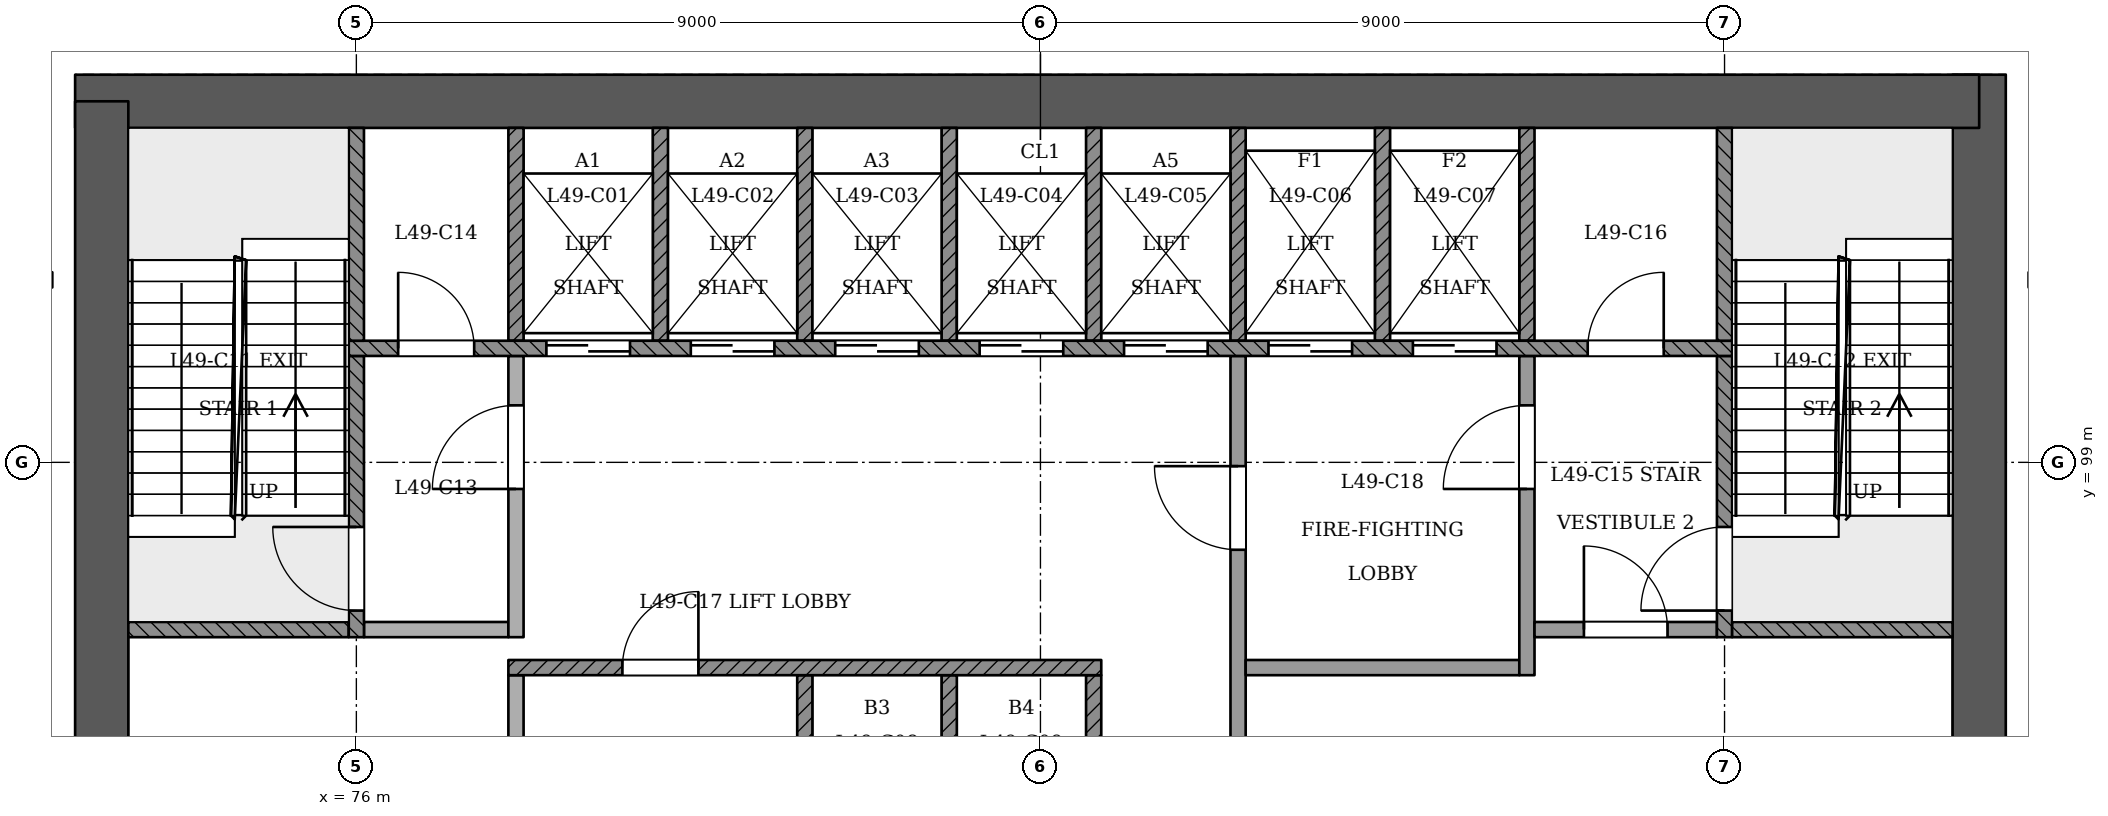
"""IFC4 building model, lengths in metres.
Left out: names, types, materials, properties, quantities, classifications, styles, units other than length and angle.
Written with IfcOpenShell. Run it as: python <this file> out.ifc"""

import sys

from ifc_helpers import new_model, si_unit, direction, frame, frame_2d, origin, place, context, subcontext, project, spatial, rectangle, extrude, element, fill, save


model = new_model("IFC4")
c1 = context("Model", 3, precision=1e-05, world=origin(), true_north=direction((0.0, 1.0)))
c2 = subcontext(c1, "Body", "Model", "MODEL_VIEW")
j1 = project(units=[si_unit("LENGTHUNIT", "METRE"), si_unit("PLANEANGLEUNIT", "RADIAN")], contexts=[c1])
p1 = place(None, origin())
s1 = spatial("IfcSite", under=j1, at=p1, CompositionType="ELEMENT")
p2 = place(p1, origin())
s2 = spatial("IfcBuilding", under=s1, at=p2, CompositionType="ELEMENT")
p3 = place(p2, frame((0.0, 0.0, 189.0)))
s3 = spatial("IfcBuildingStorey", under=s2, at=p3, CompositionType="ELEMENT", Elevation=189.0)
p4 = place(p3, frame((97.35, 93.05, 0.0), z_axis=(0.0, 0.0, 1.0), x_axis=(0.0, 1.0, 0.0)))
e1 = element("IfcWall", 1, at=p4, inside=s3, PredefinedType="SHEAR", context=c2, shape_type="SweptSolid", body=[
    extrude(rectangle(XDim=11.05, YDim=0.7, at=frame_2d((5.525, 0.0))), origin(), (0.0, 0.0, 1.0), 5.4),
])
p5 = place(p3, frame((97.35, 103.75, 0.0), z_axis=(0.0, 0.0, 1.0), x_axis=(-1.0, 0.0, 0.0)))
e2 = element("IfcWall", 2, at=p5, inside=s3, PredefinedType="SHEAR", context=c2, shape_type="SweptSolid", body=[
    extrude(rectangle(XDim=25.05, YDim=0.7, at=frame_2d((12.525, 0.0))), origin(), (0.0, 0.0, 1.0), 5.4),
])
p6 = place(p3, frame((72.65, 103.75, 0.0), z_axis=(0.0, 0.0, 1.0), x_axis=(0.0, -1.0, 0.0)))
e3 = element("IfcWall", 3, at=p6, inside=s3, PredefinedType="SHEAR", context=c2, shape_type="SweptSolid", body=[
    extrude(rectangle(XDim=11.05, YDim=0.7, at=frame_2d((5.525, 0.0))), origin(), (0.0, 0.0, 1.0), 5.4),
])
p7 = place(p3, frame((99.701, 101.4, 0.0), z_axis=(0.0, 0.0, 1.0), x_axis=(-0.999999958796, 0.000287067593, 0.0)))
e4 = element("IfcWall", 4, at=p7, inside=s3, PredefinedType="PARTITIONING", context=c2, shape_type="SweptSolid", body=[
    extrude(rectangle(XDim=1.701, YDim=0.2, at=frame_2d((0.851, 0.0))), origin(), (0.0, 0.0, 1.0), 4.95),
])
p8 = place(p3, frame((78.1, 93.4, 0.0), z_axis=(0.0, 0.0, 1.0), x_axis=(0.0, 1.0, 0.0)))
e5 = element("IfcWall", 5, at=p8, inside=s3, PredefinedType="PARTITIONING", context=c2, shape_type="SweptSolid", body=[
    extrude(rectangle(XDim=2.8, YDim=0.2, at=frame_2d((1.4, 0.0))), origin(), (0.0, 0.0, 1.0), 4.95),
])
for number, where, z_axis, x_axis in (
    (6, (81.9, 93.4, 0.0), (0.0, 0.0, 1.0), (0.0, 1.0, 0.0)),
    (7, (83.8, 93.4, 0.0), (0.0, 0.0, 1.0), (0.0, 1.0, 0.0)),
    (8, (85.7, 93.4, 0.0), (0.0, 0.0, 1.0), (0.0, 1.0, 0.0)),
):
    element("IfcWall", number, at=place(p3, frame(where, z_axis=z_axis, x_axis=x_axis)), inside=s3, PredefinedType="SOLIDWALL", context=c2, shape_type="SweptSolid", body=[
        extrude(rectangle(XDim=2.8, YDim=0.2, at=frame_2d((1.4, 0.0))), origin(), (0.0, 0.0, 1.0), 4.95),
    ])
p9 = place(p3, frame((87.6, 93.4, 0.0), z_axis=(0.0, 0.0, 1.0), x_axis=(0.0, 1.0, 0.0)))
e9 = element("IfcWall", 9, at=p9, inside=s3, PredefinedType="PARTITIONING", context=c2, shape_type="SweptSolid", body=[
    extrude(rectangle(XDim=7.0, YDim=0.2, at=frame_2d((3.5, 0.0))), origin(), (0.0, 0.0, 1.0), 4.95),
])
p10 = place(p9, frame((4.45, 0.0, 0.0)))
e10 = element("IfcOpeningElement", 10, at=p10, cuts=e9, PredefinedType="OPENING", context=c2, shape_type="SweptSolid", body=[
    extrude(rectangle(XDim=1.1, YDim=2.1, at=frame_2d((0.55, 1.05))), frame((0.0, 0.11, 0.0), z_axis=(0.0, -1.0, 0.0), x_axis=(1.0, 0.0, 0.0)), (0.0, 0.0, 1.0), 0.221),
])
p11 = place(p3, frame((78.0, 96.3, 0.0), z_axis=(0.0, 0.0, 1.0), x_axis=(1.0, 0.0, 0.0)))
e11 = element("IfcWall", 11, at=p11, inside=s3, PredefinedType="SOLIDWALL", context=c2, shape_type="SweptSolid", body=[
    extrude(rectangle(XDim=7.8, YDim=0.2, at=frame_2d((3.9, 0.0))), origin(), (0.0, 0.0, 1.0), 4.95),
])
p12 = place(p11, frame((1.5, 0.0, 0.0)))
e12 = element("IfcOpeningElement", 12, at=p12, cuts=e11, PredefinedType="OPENING", context=c2, shape_type="SweptSolid", body=[
    extrude(rectangle(XDim=1.0, YDim=2.1, at=frame_2d((0.5, 1.05))), frame((0.0, 0.11, 0.0), z_axis=(0.0, -1.0, 0.0), x_axis=(1.0, 0.0, 0.0)), (0.0, 0.0, 1.0), 0.221),
])
p13 = place(p3, frame((87.7, 96.3, 0.0), z_axis=(0.0, 0.0, 1.0), x_axis=(1.0, 0.0, 0.0)))
e13 = element("IfcWall", 13, at=p13, inside=s3, PredefinedType="PARTITIONING", context=c2, shape_type="SweptSolid", body=[
    extrude(rectangle(XDim=3.6, YDim=0.2, at=frame_2d((1.8, 0.0))), origin(), (0.0, 0.0, 1.0), 4.95),
])
p14 = place(p3, frame((91.4, 96.2, 0.0), z_axis=(0.0, 0.0, 1.0), x_axis=(0.0, 1.0, 0.0)))
e14 = element("IfcWall", 14, at=p14, inside=s3, PredefinedType="PARTITIONING", context=c2, shape_type="SweptSolid", body=[
    extrude(rectangle(XDim=4.2, YDim=0.2, at=frame_2d((2.1, 0.0))), origin(), (0.0, 0.0, 1.0), 4.95),
])
p15 = place(p14, frame((2.45, 0.0, 0.0)))
e15 = element("IfcOpeningElement", 15, at=p15, cuts=e14, PredefinedType="OPENING", context=c2, shape_type="SweptSolid", body=[
    extrude(rectangle(XDim=1.1, YDim=2.1, at=frame_2d((0.55, 1.05))), frame((0.0, 0.11, 0.0), z_axis=(0.0, -1.0, 0.0), x_axis=(1.0, 0.0, 0.0)), (0.0, 0.0, 1.0), 0.221),
])
p16 = place(p3, frame((73.0, 96.8, 0.0), z_axis=(0.0, 0.0, 1.0), x_axis=(1.0, 0.0, 0.0)))
e16 = element("IfcWall", 16, at=p16, inside=s3, PredefinedType="SOLIDWALL", context=c2, shape_type="SweptSolid", body=[
    extrude(rectangle(XDim=2.9, YDim=0.2, at=frame_2d((1.45, 0.0))), origin(), (0.0, 0.0, 1.0), 4.95),
])
p17 = place(p3, frame((76.0, 96.7, 0.0), z_axis=(0.0, 0.0, 1.0), x_axis=(0.0, 1.0, 0.0)))
e17 = element("IfcWall", 17, at=p17, inside=s3, PredefinedType="SOLIDWALL", context=c2, shape_type="SweptSolid", body=[
    extrude(rectangle(XDim=3.7, YDim=0.2, at=frame_2d((1.85, 0.0))), origin(), (0.0, 0.0, 1.0), 4.95),
])
p18 = place(p17, frame((0.35, 0.0, 0.0)))
e18 = element("IfcOpeningElement", 18, at=p18, cuts=e17, PredefinedType="OPENING", context=c2, shape_type="SweptSolid", body=[
    extrude(rectangle(XDim=1.1, YDim=2.1, at=frame_2d((0.55, 1.05))), frame((0.0, 0.11, 0.0), z_axis=(0.0, -1.0, 0.0), x_axis=(1.0, 0.0, 0.0)), (0.0, 0.0, 1.0), 0.221),
])
p19 = place(p3, frame((76.1, 96.8, 0.0), z_axis=(0.0, 0.0, 1.0), x_axis=(1.0, 0.0, 0.0)))
e19 = element("IfcWall", 19, at=p19, inside=s3, PredefinedType="PARTITIONING", context=c2, shape_type="SweptSolid", body=[
    extrude(rectangle(XDim=1.9, YDim=0.2, at=frame_2d((0.95, 0.0))), origin(), (0.0, 0.0, 1.0), 4.95),
])
p20 = place(p3, frame((78.1, 96.7, 0.0), z_axis=(0.0, 0.0, 1.0), x_axis=(0.0, 1.0, 0.0)))
e20 = element("IfcWall", 20, at=p20, inside=s3, PredefinedType="PARTITIONING", context=c2, shape_type="SweptSolid", body=[
    extrude(rectangle(XDim=3.7, YDim=0.2, at=frame_2d((1.85, 0.0))), origin(), (0.0, 0.0, 1.0), 4.95),
])
p21 = place(p20, frame((1.95, 0.0, 0.0)))
e21 = element("IfcOpeningElement", 21, at=p21, cuts=e20, PredefinedType="OPENING", context=c2, shape_type="SweptSolid", body=[
    extrude(rectangle(XDim=1.1, YDim=2.1, at=frame_2d((0.55, 1.05))), frame((0.0, 0.11, 0.0), z_axis=(0.0, -1.0, 0.0), x_axis=(1.0, 0.0, 0.0)), (0.0, 0.0, 1.0), 0.221),
])
p22 = place(p3, frame((91.5, 96.8, 0.0), z_axis=(0.0, 0.0, 1.0), x_axis=(1.0, 0.0, 0.0)))
e22 = element("IfcWall", 22, at=p22, inside=s3, PredefinedType="PARTITIONING", context=c2, shape_type="SweptSolid", body=[
    extrude(rectangle(XDim=2.4, YDim=0.2, at=frame_2d((1.2, 0.0))), origin(), (0.0, 0.0, 1.0), 4.95),
])
p23 = place(p22, frame((0.65, 0.0, 0.0)))
e23 = element("IfcOpeningElement", 23, at=p23, cuts=e22, PredefinedType="OPENING", context=c2, shape_type="SweptSolid", body=[
    extrude(rectangle(XDim=1.1, YDim=2.1, at=frame_2d((0.55, 1.05))), frame((0.0, 0.11, 0.0), z_axis=(0.0, -1.0, 0.0), x_axis=(1.0, 0.0, 0.0)), (0.0, 0.0, 1.0), 0.221),
])
p24 = place(p3, frame((94.0, 96.7, 0.0), z_axis=(0.0, 0.0, 1.0), x_axis=(0.0, 1.0, 0.0)))
e24 = element("IfcWall", 24, at=p24, inside=s3, PredefinedType="SOLIDWALL", context=c2, shape_type="SweptSolid", body=[
    extrude(rectangle(XDim=3.7, YDim=0.2, at=frame_2d((1.85, 0.0))), origin(), (0.0, 0.0, 1.0), 4.95),
])
p25 = place(p24, frame((0.35, 0.0, 0.0)))
e25 = element("IfcOpeningElement", 25, at=p25, cuts=e24, PredefinedType="OPENING", context=c2, shape_type="SweptSolid", body=[
    extrude(rectangle(XDim=1.1, YDim=2.1, at=frame_2d((0.55, 1.05))), frame((0.0, 0.11, 0.0), z_axis=(0.0, -1.0, 0.0), x_axis=(1.0, 0.0, 0.0)), (0.0, 0.0, 1.0), 0.221),
])
p26 = place(p3, frame((94.1, 96.8, 0.0), z_axis=(0.0, 0.0, 1.0), x_axis=(1.0, 0.0, 0.0)))
e26 = element("IfcWall", 26, at=p26, inside=s3, PredefinedType="SOLIDWALL", context=c2, shape_type="SweptSolid", body=[
    extrude(rectangle(XDim=2.9, YDim=0.2, at=frame_2d((1.45, 0.0))), origin(), (0.0, 0.0, 1.0), 4.95),
])
p27 = place(p3, frame((75.9, 100.5, 0.0), z_axis=(0.0, 0.0, 1.0), x_axis=(1.0, 0.0, 0.0)))
e27 = element("IfcWall", 27, at=p27, inside=s3, PredefinedType="SOLIDWALL", context=c2, shape_type="SweptSolid", body=[
    extrude(rectangle(XDim=18.2, YDim=0.2, at=frame_2d((9.1, 0.0))), origin(), (0.0, 0.0, 1.0), 4.95),
])
p28 = place(p27, frame((2.6, 0.0, 0.0)))
e28 = element("IfcOpeningElement", 28, at=p28, cuts=e27, PredefinedType="OPENING", context=c2, shape_type="SweptSolid", body=[
    extrude(rectangle(XDim=1.1, YDim=2.1, at=frame_2d((0.55, 1.05))), frame((0.0, 0.11, 0.0), z_axis=(0.0, -1.0, 0.0), x_axis=(1.0, 0.0, 0.0)), (0.0, 0.0, 1.0), 0.221),
])
p29 = place(p27, frame((4.5, 0.0, 0.0)))
e29 = element("IfcOpeningElement", 29, at=p29, cuts=e27, PredefinedType="OPENING", context=c2, shape_type="SweptSolid", body=[
    extrude(rectangle(XDim=1.1, YDim=2.1, at=frame_2d((0.55, 1.05))), frame((0.0, 0.11, 0.0), z_axis=(0.0, -1.0, 0.0), x_axis=(1.0, 0.0, 0.0)), (0.0, 0.0, 1.0), 0.221),
])
p30 = place(p27, frame((6.4, 0.0, 0.0)))
e30 = element("IfcOpeningElement", 30, at=p30, cuts=e27, PredefinedType="OPENING", context=c2, shape_type="SweptSolid", body=[
    extrude(rectangle(XDim=1.1, YDim=2.1, at=frame_2d((0.55, 1.05))), frame((0.0, 0.11, 0.0), z_axis=(0.0, -1.0, 0.0), x_axis=(1.0, 0.0, 0.0)), (0.0, 0.0, 1.0), 0.221),
])
p31 = place(p27, frame((8.3, 0.0, 0.0)))
e31 = element("IfcOpeningElement", 31, at=p31, cuts=e27, PredefinedType="OPENING", context=c2, shape_type="SweptSolid", body=[
    extrude(rectangle(XDim=1.1, YDim=2.1, at=frame_2d((0.55, 1.05))), frame((0.0, 0.11, 0.0), z_axis=(0.0, -1.0, 0.0), x_axis=(1.0, 0.0, 0.0)), (0.0, 0.0, 1.0), 0.221),
])
p32 = place(p27, frame((10.2, 0.0, 0.0)))
e32 = element("IfcOpeningElement", 32, at=p32, cuts=e27, PredefinedType="OPENING", context=c2, shape_type="SweptSolid", body=[
    extrude(rectangle(XDim=1.1, YDim=2.1, at=frame_2d((0.55, 1.05))), frame((0.0, 0.11, 0.0), z_axis=(0.0, -1.0, 0.0), x_axis=(1.0, 0.0, 0.0)), (0.0, 0.0, 1.0), 0.221),
])
p33 = place(p27, frame((12.1, 0.0, 0.0)))
e33 = element("IfcOpeningElement", 33, at=p33, cuts=e27, PredefinedType="OPENING", context=c2, shape_type="SweptSolid", body=[
    extrude(rectangle(XDim=1.1, YDim=2.1, at=frame_2d((0.55, 1.05))), frame((0.0, 0.11, 0.0), z_axis=(0.0, -1.0, 0.0), x_axis=(1.0, 0.0, 0.0)), (0.0, 0.0, 1.0), 0.221),
])
p34 = place(p27, frame((14.0, 0.0, 0.0)))
e34 = element("IfcOpeningElement", 34, at=p34, cuts=e27, PredefinedType="OPENING", context=c2, shape_type="SweptSolid", body=[
    extrude(rectangle(XDim=1.1, YDim=2.1, at=frame_2d((0.55, 1.05))), frame((0.0, 0.11, 0.0), z_axis=(0.0, -1.0, 0.0), x_axis=(1.0, 0.0, 0.0)), (0.0, 0.0, 1.0), 0.221),
])
p35 = place(p27, frame((0.65, 0.0, 0.0)))
e35 = element("IfcOpeningElement", 35, at=p35, cuts=e27, PredefinedType="OPENING", context=c2, shape_type="SweptSolid", body=[
    extrude(rectangle(XDim=1.0, YDim=2.1, at=frame_2d((0.5, 1.05))), frame((0.0, 0.11, 0.0), z_axis=(0.0, -1.0, 0.0), x_axis=(1.0, 0.0, 0.0)), (0.0, 0.0, 1.0), 0.221),
])
p36 = place(p27, frame((16.3, 0.0, 0.0)))
e36 = element("IfcOpeningElement", 36, at=p36, cuts=e27, PredefinedType="OPENING", context=c2, shape_type="SweptSolid", body=[
    extrude(rectangle(XDim=1.0, YDim=2.1, at=frame_2d((0.5, 1.05))), frame((0.0, 0.11, 0.0), z_axis=(0.0, -1.0, 0.0), x_axis=(1.0, 0.0, 0.0)), (0.0, 0.0, 1.0), 0.221),
])
for number, where, z_axis, x_axis in (
    (37, (76.0, 100.6, 0.0), (0.0, 0.0, 1.0), (0.0, 1.0, 0.0)),
    (38, (78.1, 100.6, 0.0), (0.0, 0.0, 1.0), (0.0, 1.0, 0.0)),
    (39, (80.0, 100.6, 0.0), (0.0, 0.0, 1.0), (0.0, 1.0, 0.0)),
    (40, (81.9, 100.6, 0.0), (0.0, 0.0, 1.0), (0.0, 1.0, 0.0)),
    (41, (83.8, 100.6, 0.0), (0.0, 0.0, 1.0), (0.0, 1.0, 0.0)),
    (42, (85.7, 100.6, 0.0), (0.0, 0.0, 1.0), (0.0, 1.0, 0.0)),
    (43, (87.6, 100.6, 0.0), (0.0, 0.0, 1.0), (0.0, 1.0, 0.0)),
    (44, (89.5, 100.6, 0.0), (0.0, 0.0, 1.0), (0.0, 1.0, 0.0)),
    (45, (91.4, 100.6, 0.0), (0.0, 0.0, 1.0), (0.0, 1.0, 0.0)),
    (46, (94.0, 100.6, 0.0), (0.0, 0.0, 1.0), (0.0, 1.0, 0.0)),
):
    element("IfcWall", number, at=place(p3, frame(where, z_axis=z_axis, x_axis=x_axis)), inside=s3, PredefinedType="SOLIDWALL", context=c2, shape_type="SweptSolid", body=[
        extrude(rectangle(XDim=2.8, YDim=0.2, at=frame_2d((1.4, 0.0))), origin(), (0.0, 0.0, 1.0), 4.95),
    ])
p37 = place(p28, origin())
e47 = element("IfcDoor", 47, at=p37, inside=s3, OperationType="SLIDING_TO_RIGHT", PredefinedType="NOTDEFINED", context=c2, shape_type="SweptSolid", body=[
    extrude(rectangle(XDim=1.1, YDim=2.1, at=frame_2d((0.55, 1.05))), frame((0.0, 0.025, 0.0), z_axis=(0.0, -1.0, 0.0), x_axis=(1.0, 0.0, 0.0)), (0.0, 0.0, 1.0), 0.05),
])
fill(e28, e47)
p38 = place(p29, origin())
e48 = element("IfcDoor", 48, at=p38, inside=s3, OperationType="SLIDING_TO_LEFT", PredefinedType="NOTDEFINED", context=c2, shape_type="SweptSolid", body=[
    extrude(rectangle(XDim=1.1, YDim=2.1, at=frame_2d((0.55, 1.05))), frame((0.0, 0.025, 0.0), z_axis=(0.0, -1.0, 0.0), x_axis=(1.0, 0.0, 0.0)), (0.0, 0.0, 1.0), 0.05),
])
fill(e29, e48)
p39 = place(p30, origin())
e49 = element("IfcDoor", 49, at=p39, inside=s3, OperationType="SLIDING_TO_RIGHT", PredefinedType="NOTDEFINED", context=c2, shape_type="SweptSolid", body=[
    extrude(rectangle(XDim=1.1, YDim=2.1, at=frame_2d((0.55, 1.05))), frame((0.0, 0.025, 0.0), z_axis=(0.0, -1.0, 0.0), x_axis=(1.0, 0.0, 0.0)), (0.0, 0.0, 1.0), 0.05),
])
fill(e30, e49)
p40 = place(p31, origin())
e50 = element("IfcDoor", 50, at=p40, inside=s3, OperationType="SLIDING_TO_LEFT", PredefinedType="NOTDEFINED", context=c2, shape_type="SweptSolid", body=[
    extrude(rectangle(XDim=1.1, YDim=2.1, at=frame_2d((0.55, 1.05))), frame((0.0, 0.025, 0.0), z_axis=(0.0, -1.0, 0.0), x_axis=(1.0, 0.0, 0.0)), (0.0, 0.0, 1.0), 0.05),
])
fill(e31, e50)
p41 = place(p32, origin())
e51 = element("IfcDoor", 51, at=p41, inside=s3, OperationType="SLIDING_TO_RIGHT", PredefinedType="NOTDEFINED", context=c2, shape_type="SweptSolid", body=[
    extrude(rectangle(XDim=1.1, YDim=2.1, at=frame_2d((0.55, 1.05))), frame((0.0, 0.025, 0.0), z_axis=(0.0, -1.0, 0.0), x_axis=(1.0, 0.0, 0.0)), (0.0, 0.0, 1.0), 0.05),
])
fill(e32, e51)
p42 = place(p33, origin())
e52 = element("IfcDoor", 52, at=p42, inside=s3, OperationType="SLIDING_TO_RIGHT", PredefinedType="NOTDEFINED", context=c2, shape_type="SweptSolid", body=[
    extrude(rectangle(XDim=1.1, YDim=2.1, at=frame_2d((0.55, 1.05))), frame((0.0, 0.025, 0.0), z_axis=(0.0, -1.0, 0.0), x_axis=(1.0, 0.0, 0.0)), (0.0, 0.0, 1.0), 0.05),
])
fill(e33, e52)
p43 = place(p34, origin())
e53 = element("IfcDoor", 53, at=p43, inside=s3, OperationType="SLIDING_TO_LEFT", PredefinedType="NOTDEFINED", context=c2, shape_type="SweptSolid", body=[
    extrude(rectangle(XDim=1.1, YDim=2.1, at=frame_2d((0.55, 1.05))), frame((0.0, 0.025, 0.0), z_axis=(0.0, -1.0, 0.0), x_axis=(1.0, 0.0, 0.0)), (0.0, 0.0, 1.0), 0.05),
])
fill(e34, e53)
p44 = place(p18, origin())
e54 = element("IfcDoor", 54, at=p44, inside=s3, OperationType="SINGLE_SWING_RIGHT", PredefinedType="NOTDEFINED", context=c2, shape_type="SweptSolid", body=[
    extrude(rectangle(XDim=1.1, YDim=2.1, at=frame_2d((0.55, 1.05))), frame((0.0, 0.025, 0.0), z_axis=(0.0, -1.0, 0.0), x_axis=(1.0, 0.0, 0.0)), (0.0, 0.0, 1.0), 0.05),
])
fill(e18, e54)
p45 = place(p25, origin())
e55 = element("IfcDoor", 55, at=p45, inside=s3, OperationType="SINGLE_SWING_LEFT", PredefinedType="NOTDEFINED", context=c2, shape_type="SweptSolid", body=[
    extrude(rectangle(XDim=1.1, YDim=2.1, at=frame_2d((0.55, 1.05))), frame((0.0, 0.025, 0.0), z_axis=(0.0, -1.0, 0.0), x_axis=(1.0, 0.0, 0.0)), (0.0, 0.0, 1.0), 0.05),
])
fill(e25, e55)
p46 = place(p21, origin())
e56 = element("IfcDoor", 56, at=p46, inside=s3, OperationType="SINGLE_SWING_LEFT", PredefinedType="NOTDEFINED", context=c2, shape_type="SweptSolid", body=[
    extrude(rectangle(XDim=1.1, YDim=2.1, at=frame_2d((0.55, 1.05))), frame((0.0, 0.025, 0.0), z_axis=(0.0, -1.0, 0.0), x_axis=(1.0, 0.0, 0.0)), (0.0, 0.0, 1.0), 0.05),
])
fill(e21, e56)
p47 = place(p10, origin())
e57 = element("IfcDoor", 57, at=p47, inside=s3, OperationType="SINGLE_SWING_RIGHT", PredefinedType="NOTDEFINED", context=c2, shape_type="SweptSolid", body=[
    extrude(rectangle(XDim=1.1, YDim=2.1, at=frame_2d((0.55, 1.05))), frame((0.0, 0.025, 0.0), z_axis=(0.0, -1.0, 0.0), x_axis=(1.0, 0.0, 0.0)), (0.0, 0.0, 1.0), 0.05),
])
fill(e10, e57)
p48 = place(p15, origin())
e58 = element("IfcDoor", 58, at=p48, inside=s3, OperationType="SINGLE_SWING_LEFT", PredefinedType="NOTDEFINED", context=c2, shape_type="SweptSolid", body=[
    extrude(rectangle(XDim=1.1, YDim=2.1, at=frame_2d((0.55, 1.05))), frame((0.0, 0.025, 0.0), z_axis=(0.0, -1.0, 0.0), x_axis=(1.0, 0.0, 0.0)), (0.0, 0.0, 1.0), 0.05),
])
fill(e15, e58)
p49 = place(p35, origin())
e59 = element("IfcDoor", 59, at=p49, inside=s3, OperationType="SINGLE_SWING_LEFT", PredefinedType="NOTDEFINED", context=c2, shape_type="SweptSolid", body=[
    extrude(rectangle(XDim=1.0, YDim=2.1, at=frame_2d((0.5, 1.05))), frame((0.0, 0.025, 0.0), z_axis=(0.0, -1.0, 0.0), x_axis=(1.0, 0.0, 0.0)), (0.0, 0.0, 1.0), 0.05),
])
fill(e35, e59)
p50 = place(p36, origin())
e60 = element("IfcDoor", 60, at=p50, inside=s3, OperationType="SINGLE_SWING_RIGHT", PredefinedType="NOTDEFINED", context=c2, shape_type="SweptSolid", body=[
    extrude(rectangle(XDim=1.0, YDim=2.1, at=frame_2d((0.5, 1.05))), frame((0.0, 0.025, 0.0), z_axis=(0.0, -1.0, 0.0), x_axis=(1.0, 0.0, 0.0)), (0.0, 0.0, 1.0), 0.05),
])
fill(e36, e60)
p51 = place(p23, origin())
e61 = element("IfcDoor", 61, at=p51, inside=s3, OperationType="SINGLE_SWING_LEFT", PredefinedType="NOTDEFINED", context=c2, shape_type="SweptSolid", body=[
    extrude(rectangle(XDim=1.1, YDim=2.1, at=frame_2d((0.55, 1.05))), frame((0.0, 0.025, 0.0), z_axis=(0.0, -1.0, 0.0), x_axis=(1.0, 0.0, 0.0)), (0.0, 0.0, 1.0), 0.05),
])
fill(e23, e61)
p52 = place(p12, origin())
e62 = element("IfcDoor", 62, at=p52, inside=s3, OperationType="SINGLE_SWING_RIGHT", PredefinedType="NOTDEFINED", context=c2, shape_type="SweptSolid", body=[
    extrude(rectangle(XDim=1.0, YDim=2.1, at=frame_2d((0.5, 1.05))), frame((0.0, 0.025, 0.0), z_axis=(0.0, -1.0, 0.0), x_axis=(1.0, 0.0, 0.0)), (0.0, 0.0, 1.0), 0.05),
])
fill(e12, e62)
save(model, sys.argv[1])
